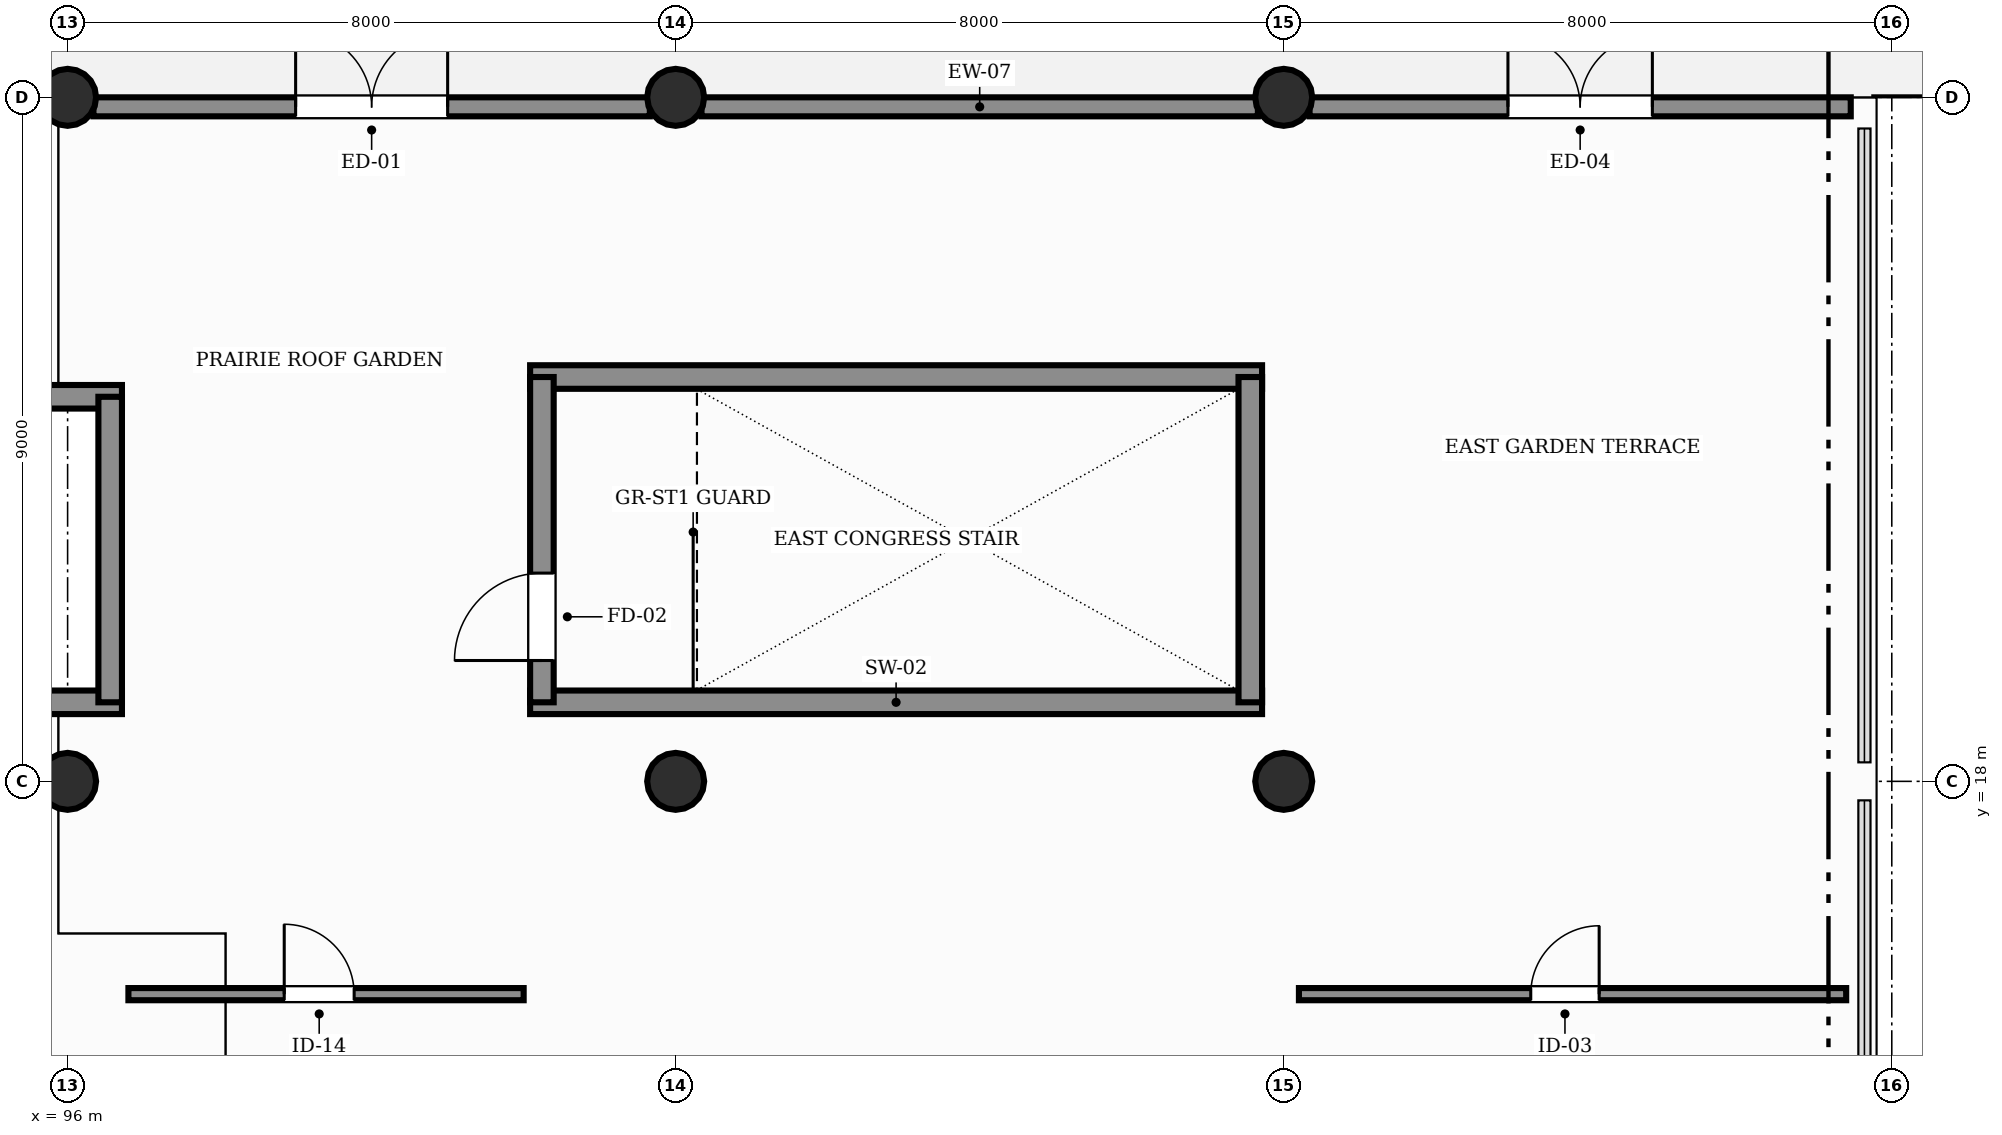
"""IFC4 building model, lengths in metres.
Left out: names, types, materials, properties, quantities, classifications, styles, units other than length and angle.
Written with IfcOpenShell. Run it as: python <this file> out.ifc"""

import sys

from ifc_helpers import new_model, si_unit, direction, frame, frame_2d, origin, origin_2d, place, context, subcontext, project, spatial, rectangle, circle, extrude, element, fill, save


model = new_model("IFC4")
c1 = context("Model", 3, precision=1e-05, world=origin(), true_north=direction((0.0, 1.0)))
c2 = subcontext(c1, "Body", "Model", "MODEL_VIEW")
j1 = project(units=[si_unit("LENGTHUNIT", "METRE"), si_unit("PLANEANGLEUNIT", "RADIAN")], contexts=[c1])
p1 = place(None, origin())
s1 = spatial("IfcSite", under=j1, at=p1, CompositionType="ELEMENT")
p2 = place(p1, origin())
s2 = spatial("IfcBuilding", under=s1, at=p2, CompositionType="ELEMENT")
p3 = place(p2, frame((0.0, 0.0, 16.2)))
s3 = spatial("IfcBuildingStorey", under=s2, at=p3, CompositionType="ELEMENT", Elevation=16.2)
for number, where, z_axis, x_axis in (
    (1, (96.0, 18.0, 0.0), (0.0, 0.0, 1.0), (1.0, 0.0, 0.0)),
    (2, (96.0, 27.0, 0.0), (0.0, 0.0, 1.0), (1.0, 0.0, 0.0)),
    (3, (104.0, 18.0, 0.0), (0.0, 0.0, 1.0), (1.0, 0.0, 0.0)),
    (4, (104.0, 27.0, 0.0), (0.0, 0.0, 1.0), (1.0, 0.0, 0.0)),
    (5, (112.0, 18.0, 0.0), (0.0, 0.0, 1.0), (1.0, 0.0, 0.0)),
    (6, (112.0, 27.0, 0.0), (0.0, 0.0, 1.0), (1.0, 0.0, 0.0)),
):
    element("IfcColumn", number, at=place(p3, frame(where, z_axis=z_axis, x_axis=x_axis)), inside=s3, PredefinedType="COLUMN", context=c2, shape_type="SweptSolid", body=[
        extrude(circle(Radius=0.375, at=origin_2d()), origin(), (0.0, 0.0, 1.0), 4.8),
    ])
p4 = place(p3, frame((96.34, 26.875, 0.0), z_axis=(0.0, 0.0, 1.0), x_axis=(1.0, 0.0, 0.0)))
e7 = element("IfcWall", 7, at=p4, inside=s3, PredefinedType="SOLIDWALL", context=c2, shape_type="SweptSolid", body=[
    extrude(rectangle(XDim=7.32, YDim=0.25, at=frame_2d((3.66, 0.0))), origin(), (0.0, 0.0, 1.0), 3.6),
])
p5 = place(p4, frame((2.66, 0.0, 0.0)))
e8 = element("IfcOpeningElement", 8, at=p5, cuts=e7, PredefinedType="OPENING", context=c2, shape_type="SweptSolid", body=[
    extrude(rectangle(XDim=2.0, YDim=2.4, at=frame_2d((1.0, 1.2))), frame((0.0, 0.135, 0.0), z_axis=(0.0, -1.0, 0.0), x_axis=(1.0, 0.0, 0.0)), (0.0, 0.0, 1.0), 0.27),
])
p6 = place(p3, frame((104.34, 26.875, 0.0), z_axis=(0.0, 0.0, 1.0), x_axis=(1.0, 0.0, 0.0)))
e9 = element("IfcWall", 9, at=p6, inside=s3, PredefinedType="SOLIDWALL", context=c2, shape_type="SweptSolid", body=[
    extrude(rectangle(XDim=7.32, YDim=0.25, at=frame_2d((3.66, 0.0))), origin(), (0.0, 0.0, 1.0), 3.6),
])
p7 = place(p3, frame((112.34, 26.875, 0.0), z_axis=(0.0, 0.0, 1.0), x_axis=(1.0, 0.0, 0.0)))
e10 = element("IfcWall", 10, at=p7, inside=s3, PredefinedType="SOLIDWALL", context=c2, shape_type="SweptSolid", body=[
    extrude(rectangle(XDim=7.12, YDim=0.25, at=frame_2d((3.56, 0.0))), origin(), (0.0, 0.0, 1.0), 3.6),
])
p8 = place(p7, frame((2.61, 0.0, 0.0)))
e11 = element("IfcOpeningElement", 11, at=p8, cuts=e10, PredefinedType="OPENING", context=c2, shape_type="SweptSolid", body=[
    extrude(rectangle(XDim=1.9, YDim=2.35, at=frame_2d((0.95, 1.175))), frame((0.0, 0.135, 0.0), z_axis=(0.0, -1.0, 0.0), x_axis=(1.0, 0.0, 0.0)), (0.0, 0.0, 1.0), 0.27),
])
for number, where, z_axis, x_axis in (
    (12, (102.085, 19.04, 0.0), (0.0, 0.0, 1.0), (1.0, 0.0, 0.0)),
    (13, (102.085, 23.32, 0.0), (0.0, 0.0, 1.0), (1.0, 0.0, 0.0)),
):
    element("IfcWall", number, at=place(p3, frame(where, z_axis=z_axis, x_axis=x_axis)), inside=s3, PredefinedType="SHEAR", context=c2, shape_type="SweptSolid", body=[
        extrude(rectangle(XDim=9.63, YDim=0.31, at=frame_2d((4.815, 0.0))), origin(), (0.0, 0.0, 1.0), 4.8),
    ])
p9 = place(p3, frame((102.24, 19.04, 0.0), z_axis=(0.0, 0.0, 1.0), x_axis=(0.0, 1.0, 0.0)))
e14 = element("IfcWall", 14, at=p9, inside=s3, PredefinedType="SHEAR", context=c2, shape_type="SweptSolid", body=[
    extrude(rectangle(XDim=4.28, YDim=0.31, at=frame_2d((2.14, 0.0))), origin(), (0.0, 0.0, 1.0), 4.8),
])
p10 = place(p9, frame((0.55, 0.0, 0.0)))
e15 = element("IfcOpeningElement", 15, at=p10, cuts=e14, PredefinedType="OPENING", context=c2, shape_type="SweptSolid", body=[
    extrude(rectangle(XDim=1.15, YDim=2.2, at=frame_2d((0.575, 1.1))), frame((0.0, 0.165, 0.0), z_axis=(0.0, -1.0, 0.0), x_axis=(1.0, 0.0, 0.0)), (0.0, 0.0, 1.0), 0.33),
])
p11 = place(p3, frame((111.56, 19.04, 0.0), z_axis=(0.0, 0.0, 1.0), x_axis=(0.0, 1.0, 0.0)))
e16 = element("IfcWall", 16, at=p11, inside=s3, PredefinedType="SHEAR", context=c2, shape_type="SweptSolid", body=[
    extrude(rectangle(XDim=4.28, YDim=0.31, at=frame_2d((2.14, 0.0))), origin(), (0.0, 0.0, 1.0), 4.8),
])
for number, where, z_axis, x_axis in (
    (17, (87.085, 19.04, 0.0), (0.0, 0.0, 1.0), (1.0, 0.0, 0.0)),
    (18, (87.085, 23.06, 0.0), (0.0, 0.0, 1.0), (1.0, 0.0, 0.0)),
):
    element("IfcWall", number, at=place(p3, frame(where, z_axis=z_axis, x_axis=x_axis)), inside=s3, PredefinedType="SHEAR", context=c2, shape_type="SweptSolid", body=[
        extrude(rectangle(XDim=9.63, YDim=0.31, at=frame_2d((4.815, 0.0))), origin(), (0.0, 0.0, 1.0), 4.8),
    ])
p12 = place(p3, frame((96.56, 19.04, 0.0), z_axis=(0.0, 0.0, 1.0), x_axis=(0.0, 1.0, 0.0)))
e19 = element("IfcWall", 19, at=p12, inside=s3, PredefinedType="SHEAR", context=c2, shape_type="SweptSolid", body=[
    extrude(rectangle(XDim=4.02, YDim=0.31, at=frame_2d((2.01, 0.0))), origin(), (0.0, 0.0, 1.0), 4.8),
])
p13 = place(p3, frame((96.8, 15.2, 0.0), z_axis=(0.0, 0.0, 1.0), x_axis=(1.0, 0.0, 0.0)))
e20 = element("IfcWall", 20, at=p13, inside=s3, PredefinedType="PARTITIONING", context=c2, shape_type="SweptSolid", body=[
    extrude(rectangle(XDim=5.2, YDim=0.16, at=frame_2d((2.6, 0.0))), origin(), (0.0, 0.0, 1.0), 3.55),
])
p14 = place(p13, frame((2.05, 0.0, 0.0)))
e21 = element("IfcOpeningElement", 21, at=p14, cuts=e20, PredefinedType="OPENING", context=c2, shape_type="SweptSolid", body=[
    extrude(rectangle(XDim=0.92, YDim=2.15, at=frame_2d((0.46, 1.075))), frame((0.0, 0.09, 0.0), z_axis=(0.0, -1.0, 0.0), x_axis=(1.0, 0.0, 0.0)), (0.0, 0.0, 1.0), 0.18),
])
p15 = place(p3, frame((112.2, 15.2, 0.0), z_axis=(0.0, 0.0, 1.0), x_axis=(1.0, 0.0, 0.0)))
e22 = element("IfcWall", 22, at=p15, inside=s3, PredefinedType="PARTITIONING", context=c2, shape_type="SweptSolid", body=[
    extrude(rectangle(XDim=7.2, YDim=0.16, at=frame_2d((3.6, 0.0))), origin(), (0.0, 0.0, 1.0), 3.55),
])
p16 = place(p15, frame((3.05, 0.0, 0.0)))
e23 = element("IfcOpeningElement", 23, at=p16, cuts=e22, PredefinedType="OPENING", context=c2, shape_type="SweptSolid", body=[
    extrude(rectangle(XDim=0.9, YDim=2.15, at=frame_2d((0.45, 1.075))), frame((0.0, 0.09, 0.0), z_axis=(0.0, -1.0, 0.0), x_axis=(1.0, 0.0, 0.0)), (0.0, 0.0, 1.0), 0.18),
])
p17 = place(p5, origin())
e24 = element("IfcDoor", 24, at=p17, inside=s3, OperationType="DOUBLE_DOOR_SINGLE_SWING", PredefinedType="DOOR", context=c2, shape_type="SweptSolid", body=[
    extrude(rectangle(XDim=2.0, YDim=2.4, at=frame_2d((1.0, 1.2))), frame((0.0, 0.025, 0.0), z_axis=(0.0, -1.0, 0.0), x_axis=(1.0, 0.0, 0.0)), (0.0, 0.0, 1.0), 0.05),
])
fill(e8, e24)
p18 = place(p8, origin())
e25 = element("IfcDoor", 25, at=p18, inside=s3, OperationType="DOUBLE_DOOR_SINGLE_SWING", PredefinedType="DOOR", context=c2, shape_type="SweptSolid", body=[
    extrude(rectangle(XDim=1.9, YDim=2.35, at=frame_2d((0.95, 1.175))), frame((0.0, 0.025, 0.0), z_axis=(0.0, -1.0, 0.0), x_axis=(1.0, 0.0, 0.0)), (0.0, 0.0, 1.0), 0.05),
])
fill(e11, e25)
p19 = place(p10, origin())
e26 = element("IfcDoor", 26, at=p19, inside=s3, OperationType="SINGLE_SWING_LEFT", PredefinedType="DOOR", context=c2, shape_type="SweptSolid", body=[
    extrude(rectangle(XDim=1.15, YDim=2.2, at=frame_2d((0.575, 1.1))), frame((0.0, 0.025, 0.0), z_axis=(0.0, -1.0, 0.0), x_axis=(1.0, 0.0, 0.0)), (0.0, 0.0, 1.0), 0.05),
])
fill(e15, e26)
p20 = place(p14, origin())
e27 = element("IfcDoor", 27, at=p20, inside=s3, OperationType="SINGLE_SWING_LEFT", PredefinedType="DOOR", context=c2, shape_type="SweptSolid", body=[
    extrude(rectangle(XDim=0.92, YDim=2.15, at=frame_2d((0.46, 1.075))), frame((0.0, 0.025, 0.0), z_axis=(0.0, -1.0, 0.0), x_axis=(1.0, 0.0, 0.0)), (0.0, 0.0, 1.0), 0.05),
])
fill(e21, e27)
p21 = place(p16, origin())
e28 = element("IfcDoor", 28, at=p21, inside=s3, OperationType="SINGLE_SWING_RIGHT", PredefinedType="DOOR", context=c2, shape_type="SweptSolid", body=[
    extrude(rectangle(XDim=0.9, YDim=2.15, at=frame_2d((0.45, 1.075))), frame((0.0, 0.025, 0.0), z_axis=(0.0, -1.0, 0.0), x_axis=(1.0, 0.0, 0.0)), (0.0, 0.0, 1.0), 0.05),
])
fill(e23, e28)
save(model, sys.argv[1])
